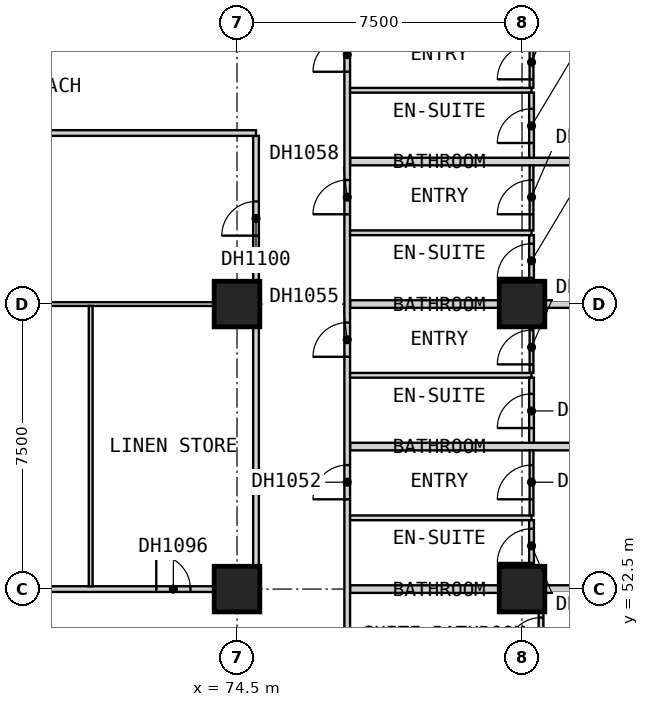
"""IFC4 building model, lengths in metres.
Left out: names, types, materials, properties, quantities, classifications, styles, units other than length and angle.
Written with IfcOpenShell. Run it as: python <this file> out.ifc"""

import sys

from ifc_helpers import new_model, si_unit, direction, frame, frame_2d, origin, origin_2d, place, context, subcontext, project, spatial, rectangle, extrude, element, fill, save


model = new_model("IFC4")
c1 = context("Model", 3, precision=1e-05, world=origin(), true_north=direction((0.0, 1.0)))
c2 = subcontext(c1, "Body", "Model", "MODEL_VIEW")
j1 = project(units=[si_unit("LENGTHUNIT", "METRE"), si_unit("PLANEANGLEUNIT", "RADIAN")], contexts=[c1])
p1 = place(None, origin())
s1 = spatial("IfcSite", under=j1, at=p1, CompositionType="ELEMENT")
p2 = place(p1, origin())
s2 = spatial("IfcBuilding", under=s1, at=p2, CompositionType="ELEMENT")
p3 = place(p2, frame((0.0, 0.0, 48.4)))
s3 = spatial("IfcBuildingStorey", under=s2, at=p3, CompositionType="ELEMENT", Elevation=48.4)
for number, where, z_axis, x_axis in (
    (1, (74.5, 52.5, 0.0), (0.0, 0.0, 1.0), (1.0, 0.0, 0.0)),
    (2, (74.5, 60.0, 0.0), (0.0, 0.0, 1.0), (1.0, 0.0, 0.0)),
    (3, (82.0, 52.5, 0.0), (0.0, 0.0, 1.0), (1.0, 0.0, 0.0)),
    (4, (82.0, 60.0, 0.0), (0.0, 0.0, 1.0), (1.0, 0.0, 0.0)),
):
    element("IfcColumn", number, at=place(p3, frame(where, z_axis=z_axis, x_axis=x_axis)), inside=s3, PredefinedType="COLUMN", context=c2, shape_type="SweptSolid", body=[
        extrude(rectangle(XDim=1.2, YDim=1.2, at=origin_2d()), origin(), (0.0, 0.0, 1.0), 3.6),
    ])
p4 = place(p3, frame((77.475, 52.5, 0.0), z_axis=(0.0, 0.0, 1.0), x_axis=(1.0, 0.0, 0.0)))
e5 = element("IfcWall", 5, at=p4, inside=s3, PredefinedType="PARTITIONING", context=c2, shape_type="SweptSolid", body=[
    extrude(rectangle(XDim=12.525, YDim=0.2, at=frame_2d((6.262, 0.0))), origin(), (0.0, 0.0, 1.0), 3.35),
])
p5 = place(p3, frame((77.475, 56.25, 0.0), z_axis=(0.0, 0.0, 1.0), x_axis=(1.0, 0.0, 0.0)))
e6 = element("IfcWall", 6, at=p5, inside=s3, PredefinedType="PARTITIONING", context=c2, shape_type="SweptSolid", body=[
    extrude(rectangle(XDim=11.715, YDim=0.2, at=frame_2d((5.857, 0.0))), origin(), (0.0, 0.0, 1.0), 3.35),
])
p6 = place(p3, frame((77.475, 60.0, 0.0), z_axis=(0.0, 0.0, 1.0), x_axis=(1.0, 0.0, 0.0)))
e7 = element("IfcWall", 7, at=p6, inside=s3, PredefinedType="PARTITIONING", context=c2, shape_type="SweptSolid", body=[
    extrude(rectangle(XDim=12.525, YDim=0.2, at=frame_2d((6.262, 0.0))), origin(), (0.0, 0.0, 1.0), 3.35),
])
p7 = place(p3, frame((77.475, 63.75, 0.0), z_axis=(0.0, 0.0, 1.0), x_axis=(1.0, 0.0, 0.0)))
e8 = element("IfcWall", 8, at=p7, inside=s3, PredefinedType="PARTITIONING", context=c2, shape_type="SweptSolid", body=[
    extrude(rectangle(XDim=11.715, YDim=0.2, at=frame_2d((5.857, 0.0))), origin(), (0.0, 0.0, 1.0), 3.35),
])
p8 = place(p3, frame((60.0, 52.5, 0.0), z_axis=(0.0, 0.0, 1.0), x_axis=(1.0, 0.0, 0.0)))
e9 = element("IfcWall", 9, at=p8, inside=s3, PredefinedType="PARTITIONING", context=c2, shape_type="SweptSolid", body=[
    extrude(rectangle(XDim=15.0, YDim=0.15, at=frame_2d((7.5, 0.0))), origin(), (0.0, 0.0, 1.0), 3.35),
])
p9 = place(p8, frame((4.875, 0.0, 0.0)))
e10 = element("IfcOpeningElement", 10, at=p9, cuts=e9, PredefinedType="OPENING", context=c2, shape_type="SweptSolid", body=[
    extrude(rectangle(XDim=0.9, YDim=2.1, at=frame_2d((0.45, 1.05))), frame((0.0, 0.085, 0.0), z_axis=(0.0, -1.0, 0.0), x_axis=(1.0, 0.0, 0.0)), (0.0, 0.0, 1.0), 0.17),
])
p10 = place(p8, frame((12.375, 0.0, 0.0)))
e11 = element("IfcOpeningElement", 11, at=p10, cuts=e9, PredefinedType="OPENING", context=c2, shape_type="SweptSolid", body=[
    extrude(rectangle(XDim=0.9, YDim=2.1, at=frame_2d((0.45, 1.05))), frame((0.0, 0.085, 0.0), z_axis=(0.0, -1.0, 0.0), x_axis=(1.0, 0.0, 0.0)), (0.0, 0.0, 1.0), 0.17),
])
p11 = place(p3, frame((75.0, 52.575, 0.0), z_axis=(0.0, 0.0, 1.0), x_axis=(0.0, 1.0, 0.0)))
e12 = element("IfcWall", 12, at=p11, inside=s3, PredefinedType="PARTITIONING", context=c2, shape_type="SweptSolid", body=[
    extrude(rectangle(XDim=11.85, YDim=0.15, at=frame_2d((5.925, 0.0))), origin(), (0.0, 0.0, 1.0), 3.35),
])
p12 = place(p11, frame((9.225, 0.0, 0.0)))
e13 = element("IfcOpeningElement", 13, at=p12, cuts=e12, PredefinedType="OPENING", context=c2, shape_type="SweptSolid", body=[
    extrude(rectangle(XDim=0.9, YDim=2.1, at=frame_2d((0.45, 1.05))), frame((0.0, 0.085, 0.0), z_axis=(0.0, -1.0, 0.0), x_axis=(1.0, 0.0, 0.0)), (0.0, 0.0, 1.0), 0.17),
])
p13 = place(p3, frame((77.4, 50.175, 0.0), z_axis=(0.0, 0.0, 1.0), x_axis=(0.0, 1.0, 0.0)))
e14 = element("IfcWall", 14, at=p13, inside=s3, PredefinedType="PARTITIONING", context=c2, shape_type="SweptSolid", body=[
    extrude(rectangle(XDim=42.15, YDim=0.15, at=frame_2d((21.075, 0.0))), origin(), (0.0, 0.0, 1.0), 3.35),
])
p14 = place(p13, frame((4.688, 0.0, 0.0)))
e15 = element("IfcOpeningElement", 15, at=p14, cuts=e14, PredefinedType="OPENING", context=c2, shape_type="SweptSolid", body=[
    extrude(rectangle(XDim=0.9, YDim=2.1, at=frame_2d((0.45, 1.05))), frame((0.0, 0.085, 0.0), z_axis=(0.0, -1.0, 0.0), x_axis=(1.0, 0.0, 0.0)), (0.0, 0.0, 1.0), 0.17),
])
p15 = place(p13, frame((8.438, 0.0, 0.0)))
e16 = element("IfcOpeningElement", 16, at=p15, cuts=e14, PredefinedType="OPENING", context=c2, shape_type="SweptSolid", body=[
    extrude(rectangle(XDim=0.9, YDim=2.1, at=frame_2d((0.45, 1.05))), frame((0.0, 0.085, 0.0), z_axis=(0.0, -1.0, 0.0), x_axis=(1.0, 0.0, 0.0)), (0.0, 0.0, 1.0), 0.17),
])
p16 = place(p13, frame((12.188, 0.0, 0.0)))
e17 = element("IfcOpeningElement", 17, at=p16, cuts=e14, PredefinedType="OPENING", context=c2, shape_type="SweptSolid", body=[
    extrude(rectangle(XDim=0.9, YDim=2.1, at=frame_2d((0.45, 1.05))), frame((0.0, 0.085, 0.0), z_axis=(0.0, -1.0, 0.0), x_axis=(1.0, 0.0, 0.0)), (0.0, 0.0, 1.0), 0.17),
])
p17 = place(p13, frame((15.938, 0.0, 0.0)))
e18 = element("IfcOpeningElement", 18, at=p17, cuts=e14, PredefinedType="OPENING", context=c2, shape_type="SweptSolid", body=[
    extrude(rectangle(XDim=0.9, YDim=2.1, at=frame_2d((0.45, 1.05))), frame((0.0, 0.085, 0.0), z_axis=(0.0, -1.0, 0.0), x_axis=(1.0, 0.0, 0.0)), (0.0, 0.0, 1.0), 0.17),
])
p18 = place(p13, frame((19.688, 0.0, 0.0)))
e19 = element("IfcOpeningElement", 19, at=p18, cuts=e14, PredefinedType="OPENING", context=c2, shape_type="SweptSolid", body=[
    extrude(rectangle(XDim=0.9, YDim=2.1, at=frame_2d((0.45, 1.05))), frame((0.0, 0.085, 0.0), z_axis=(0.0, -1.0, 0.0), x_axis=(1.0, 0.0, 0.0)), (0.0, 0.0, 1.0), 0.17),
])
p19 = place(p13, frame((23.438, 0.0, 0.0)))
e20 = element("IfcOpeningElement", 20, at=p19, cuts=e14, PredefinedType="OPENING", context=c2, shape_type="SweptSolid", body=[
    extrude(rectangle(XDim=0.9, YDim=2.1, at=frame_2d((0.45, 1.05))), frame((0.0, 0.085, 0.0), z_axis=(0.0, -1.0, 0.0), x_axis=(1.0, 0.0, 0.0)), (0.0, 0.0, 1.0), 0.17),
])
p20 = place(p13, frame((27.188, 0.0, 0.0)))
e21 = element("IfcOpeningElement", 21, at=p20, cuts=e14, PredefinedType="OPENING", context=c2, shape_type="SweptSolid", body=[
    extrude(rectangle(XDim=0.9, YDim=2.1, at=frame_2d((0.45, 1.05))), frame((0.0, 0.085, 0.0), z_axis=(0.0, -1.0, 0.0), x_axis=(1.0, 0.0, 0.0)), (0.0, 0.0, 1.0), 0.17),
])
p21 = place(p13, frame((30.938, 0.0, 0.0)))
e22 = element("IfcOpeningElement", 22, at=p21, cuts=e14, PredefinedType="OPENING", context=c2, shape_type="SweptSolid", body=[
    extrude(rectangle(XDim=0.9, YDim=2.1, at=frame_2d((0.45, 1.05))), frame((0.0, 0.085, 0.0), z_axis=(0.0, -1.0, 0.0), x_axis=(1.0, 0.0, 0.0)), (0.0, 0.0, 1.0), 0.17),
])
p22 = place(p13, frame((34.688, 0.0, 0.0)))
e23 = element("IfcOpeningElement", 23, at=p22, cuts=e14, PredefinedType="OPENING", context=c2, shape_type="SweptSolid", body=[
    extrude(rectangle(XDim=0.9, YDim=2.1, at=frame_2d((0.45, 1.05))), frame((0.0, 0.085, 0.0), z_axis=(0.0, -1.0, 0.0), x_axis=(1.0, 0.0, 0.0)), (0.0, 0.0, 1.0), 0.17),
])
p23 = place(p13, frame((38.438, 0.0, 0.0)))
e24 = element("IfcOpeningElement", 24, at=p23, cuts=e14, PredefinedType="OPENING", context=c2, shape_type="SweptSolid", body=[
    extrude(rectangle(XDim=0.9, YDim=2.1, at=frame_2d((0.45, 1.05))), frame((0.0, 0.085, 0.0), z_axis=(0.0, -1.0, 0.0), x_axis=(1.0, 0.0, 0.0)), (0.0, 0.0, 1.0), 0.17),
])
p24 = place(p3, frame((60.075, 60.0, 0.0), z_axis=(0.0, 0.0, 1.0), x_axis=(1.0, 0.0, 0.0)))
e25 = element("IfcWall", 25, at=p24, inside=s3, PredefinedType="PARTITIONING", context=c2, shape_type="SweptSolid", body=[
    extrude(rectangle(XDim=14.85, YDim=0.1, at=frame_2d((7.425, 0.0))), origin(), (0.0, 0.0, 1.0), 3.35),
])
p25 = place(p3, frame((70.65, 52.575, 0.0), z_axis=(0.0, 0.0, 1.0), x_axis=(0.0, 1.0, 0.0)))
e26 = element("IfcWall", 26, at=p25, inside=s3, PredefinedType="PARTITIONING", context=c2, shape_type="SweptSolid", body=[
    extrude(rectangle(XDim=7.375, YDim=0.1, at=frame_2d((3.688, 0.0))), origin(), (0.0, 0.0, 1.0), 3.35),
])
p26 = place(p3, frame((82.25, 54.438, 0.0), z_axis=(0.0, 0.0, 1.0), x_axis=(0.0, 1.0, 0.0)))
e27 = element("IfcWall", 27, at=p26, inside=s3, PredefinedType="PARTITIONING", context=c2, shape_type="SweptSolid", body=[
    extrude(rectangle(XDim=1.712, YDim=0.1, at=frame_2d((0.856, 0.0))), origin(), (0.0, 0.0, 1.0), 3.35),
])
p27 = place(p26, frame((0.425, 0.0, 0.0)))
e28 = element("IfcOpeningElement", 28, at=p27, cuts=e27, PredefinedType="OPENING", context=c2, shape_type="SweptSolid", body=[
    extrude(rectangle(XDim=0.9, YDim=2.1, at=frame_2d((0.45, 1.05))), frame((0.0, 0.06, 0.0), z_axis=(0.0, -1.0, 0.0), x_axis=(1.0, 0.0, 0.0)), (0.0, 0.0, 1.0), 0.12),
])
p28 = place(p3, frame((82.25, 58.188, 0.0), z_axis=(0.0, 0.0, 1.0), x_axis=(0.0, 1.0, 0.0)))
e29 = element("IfcWall", 29, at=p28, inside=s3, PredefinedType="PARTITIONING", context=c2, shape_type="SweptSolid", body=[
    extrude(rectangle(XDim=1.712, YDim=0.1, at=frame_2d((0.856, 0.0))), origin(), (0.0, 0.0, 1.0), 3.35),
])
p29 = place(p28, frame((0.225, 0.0, 0.0)))
e30 = element("IfcOpeningElement", 30, at=p29, cuts=e29, PredefinedType="OPENING", context=c2, shape_type="SweptSolid", body=[
    extrude(rectangle(XDim=0.9, YDim=2.1, at=frame_2d((0.45, 1.05))), frame((0.0, 0.06, 0.0), z_axis=(0.0, -1.0, 0.0), x_axis=(1.0, 0.0, 0.0)), (0.0, 0.0, 1.0), 0.12),
])
p30 = place(p3, frame((82.25, 61.938, 0.0), z_axis=(0.0, 0.0, 1.0), x_axis=(0.0, 1.0, 0.0)))
e31 = element("IfcWall", 31, at=p30, inside=s3, PredefinedType="PARTITIONING", context=c2, shape_type="SweptSolid", body=[
    extrude(rectangle(XDim=1.712, YDim=0.1, at=frame_2d((0.856, 0.0))), origin(), (0.0, 0.0, 1.0), 3.35),
])
p31 = place(p30, frame((0.425, 0.0, 0.0)))
e32 = element("IfcOpeningElement", 32, at=p31, cuts=e31, PredefinedType="OPENING", context=c2, shape_type="SweptSolid", body=[
    extrude(rectangle(XDim=0.9, YDim=2.1, at=frame_2d((0.45, 1.05))), frame((0.0, 0.06, 0.0), z_axis=(0.0, -1.0, 0.0), x_axis=(1.0, 0.0, 0.0)), (0.0, 0.0, 1.0), 0.12),
])
p32 = place(p3, frame((82.25, 65.688, 0.0), z_axis=(0.0, 0.0, 1.0), x_axis=(0.0, 1.0, 0.0)))
e33 = element("IfcWall", 33, at=p32, inside=s3, PredefinedType="PARTITIONING", context=c2, shape_type="SweptSolid", body=[
    extrude(rectangle(XDim=1.712, YDim=0.1, at=frame_2d((0.856, 0.0))), origin(), (0.0, 0.0, 1.0), 3.35),
])
p33 = place(p32, frame((0.225, 0.0, 0.0)))
e34 = element("IfcOpeningElement", 34, at=p33, cuts=e33, PredefinedType="OPENING", context=c2, shape_type="SweptSolid", body=[
    extrude(rectangle(XDim=0.9, YDim=2.1, at=frame_2d((0.45, 1.05))), frame((0.0, 0.06, 0.0), z_axis=(0.0, -1.0, 0.0), x_axis=(1.0, 0.0, 0.0)), (0.0, 0.0, 1.0), 0.12),
])
for number, where, z_axis, x_axis in (
    (35, (77.475, 54.375, 0.0), (0.0, 0.0, 1.0), (1.0, 0.0, 0.0)),
    (36, (77.475, 58.125, 0.0), (0.0, 0.0, 1.0), (1.0, 0.0, 0.0)),
    (37, (77.475, 61.875, 0.0), (0.0, 0.0, 1.0), (1.0, 0.0, 0.0)),
    (38, (77.475, 65.625, 0.0), (0.0, 0.0, 1.0), (1.0, 0.0, 0.0)),
):
    element("IfcWall", number, at=place(p3, frame(where, z_axis=z_axis, x_axis=x_axis)), inside=s3, PredefinedType="PARTITIONING", context=c2, shape_type="SweptSolid", body=[
        extrude(rectangle(XDim=4.775, YDim=0.125, at=frame_2d((2.387, 0.0))), origin(), (0.0, 0.0, 1.0), 3.35),
    ])
p34 = place(p3, frame((82.25, 52.6, 0.0), z_axis=(0.0, 0.0, 1.0), x_axis=(0.0, 1.0, 0.0)))
e39 = element("IfcWall", 39, at=p34, inside=s3, PredefinedType="PARTITIONING", context=c2, shape_type="SweptSolid", body=[
    extrude(rectangle(XDim=1.712, YDim=0.125, at=frame_2d((0.856, 0.0))), origin(), (0.0, 0.0, 1.0), 3.35),
])
p35 = place(p34, frame((0.587, 0.0, 0.0)))
e40 = element("IfcOpeningElement", 40, at=p35, cuts=e39, PredefinedType="OPENING", context=c2, shape_type="SweptSolid", body=[
    extrude(rectangle(XDim=0.9, YDim=2.1, at=frame_2d((0.45, 1.05))), frame((0.0, 0.073, 0.0), z_axis=(0.0, -1.0, 0.0), x_axis=(1.0, 0.0, 0.0)), (0.0, 0.0, 1.0), 0.145),
])
p36 = place(p3, frame((82.25, 56.35, 0.0), z_axis=(0.0, 0.0, 1.0), x_axis=(0.0, 1.0, 0.0)))
e41 = element("IfcWall", 41, at=p36, inside=s3, PredefinedType="PARTITIONING", context=c2, shape_type="SweptSolid", body=[
    extrude(rectangle(XDim=1.712, YDim=0.125, at=frame_2d((0.856, 0.0))), origin(), (0.0, 0.0, 1.0), 3.35),
])
p37 = place(p36, frame((0.387, 0.0, 0.0)))
e42 = element("IfcOpeningElement", 42, at=p37, cuts=e41, PredefinedType="OPENING", context=c2, shape_type="SweptSolid", body=[
    extrude(rectangle(XDim=0.9, YDim=2.1, at=frame_2d((0.45, 1.05))), frame((0.0, 0.073, 0.0), z_axis=(0.0, -1.0, 0.0), x_axis=(1.0, 0.0, 0.0)), (0.0, 0.0, 1.0), 0.145),
])
p38 = place(p3, frame((82.25, 60.1, 0.0), z_axis=(0.0, 0.0, 1.0), x_axis=(0.0, 1.0, 0.0)))
e43 = element("IfcWall", 43, at=p38, inside=s3, PredefinedType="PARTITIONING", context=c2, shape_type="SweptSolid", body=[
    extrude(rectangle(XDim=1.712, YDim=0.125, at=frame_2d((0.856, 0.0))), origin(), (0.0, 0.0, 1.0), 3.35),
])
p39 = place(p38, frame((0.587, 0.0, 0.0)))
e44 = element("IfcOpeningElement", 44, at=p39, cuts=e43, PredefinedType="OPENING", context=c2, shape_type="SweptSolid", body=[
    extrude(rectangle(XDim=0.9, YDim=2.1, at=frame_2d((0.45, 1.05))), frame((0.0, 0.073, 0.0), z_axis=(0.0, -1.0, 0.0), x_axis=(1.0, 0.0, 0.0)), (0.0, 0.0, 1.0), 0.145),
])
p40 = place(p3, frame((82.25, 63.85, 0.0), z_axis=(0.0, 0.0, 1.0), x_axis=(0.0, 1.0, 0.0)))
e45 = element("IfcWall", 45, at=p40, inside=s3, PredefinedType="PARTITIONING", context=c2, shape_type="SweptSolid", body=[
    extrude(rectangle(XDim=1.712, YDim=0.125, at=frame_2d((0.856, 0.0))), origin(), (0.0, 0.0, 1.0), 3.35),
])
p41 = place(p40, frame((0.387, 0.0, 0.0)))
e46 = element("IfcOpeningElement", 46, at=p41, cuts=e45, PredefinedType="OPENING", context=c2, shape_type="SweptSolid", body=[
    extrude(rectangle(XDim=0.9, YDim=2.1, at=frame_2d((0.45, 1.05))), frame((0.0, 0.073, 0.0), z_axis=(0.0, -1.0, 0.0), x_axis=(1.0, 0.0, 0.0)), (0.0, 0.0, 1.0), 0.145),
])
p42 = place(p3, frame((82.5, 50.163, 0.0), z_axis=(0.0, 0.0, 1.0), x_axis=(0.0, 1.0, 0.0)))
e47 = element("IfcWall", 47, at=p42, inside=s3, PredefinedType="PARTITIONING", context=c2, shape_type="SweptSolid", body=[
    extrude(rectangle(XDim=2.237, YDim=0.125, at=frame_2d((1.119, 0.0))), origin(), (0.0, 0.0, 1.0), 3.35),
])
p43 = place(p42, frame((0.688, 0.0, 0.0)))
e48 = element("IfcOpeningElement", 48, at=p43, cuts=e47, PredefinedType="OPENING", context=c2, shape_type="SweptSolid", body=[
    extrude(rectangle(XDim=0.9, YDim=2.1, at=frame_2d((0.45, 1.05))), frame((0.0, 0.073, 0.0), z_axis=(0.0, -1.0, 0.0), x_axis=(1.0, 0.0, 0.0)), (0.0, 0.0, 1.0), 0.145),
])
p44 = place(p3, frame((60.0, 64.5, 0.0), z_axis=(0.0, 0.0, 1.0), x_axis=(1.0, 0.0, 0.0)))
e49 = element("IfcWall", 49, at=p44, inside=s3, PredefinedType="PARTITIONING", context=c2, shape_type="SweptSolid", body=[
    extrude(rectangle(XDim=15.0, YDim=0.15, at=frame_2d((7.5, 0.0))), origin(), (0.0, 0.0, 1.0), 3.35),
])
p45 = place(p35, origin())
e50 = element("IfcDoor", 50, at=p45, inside=s3, OperationType="SINGLE_SWING_RIGHT", PredefinedType="DOOR", context=c2, shape_type="SweptSolid", body=[
    extrude(rectangle(XDim=0.9, YDim=2.1, at=frame_2d((0.45, 1.05))), frame((0.0, 0.025, 0.0), z_axis=(0.0, -1.0, 0.0), x_axis=(1.0, 0.0, 0.0)), (0.0, 0.0, 1.0), 0.05),
])
fill(e40, e50)
p46 = place(p14, origin())
e51 = element("IfcDoor", 51, at=p46, inside=s3, OperationType="SINGLE_SWING_RIGHT", PredefinedType="DOOR", context=c2, shape_type="SweptSolid", body=[
    extrude(rectangle(XDim=0.9, YDim=2.1, at=frame_2d((0.45, 1.05))), frame((0.0, 0.025, 0.0), z_axis=(0.0, -1.0, 0.0), x_axis=(1.0, 0.0, 0.0)), (0.0, 0.0, 1.0), 0.05),
])
fill(e15, e51)
p47 = place(p27, origin())
e52 = element("IfcDoor", 52, at=p47, inside=s3, OperationType="SINGLE_SWING_LEFT", PredefinedType="DOOR", context=c2, shape_type="SweptSolid", body=[
    extrude(rectangle(XDim=0.9, YDim=2.1, at=frame_2d((0.45, 1.05))), frame((0.0, 0.025, 0.0), z_axis=(0.0, -1.0, 0.0), x_axis=(1.0, 0.0, 0.0)), (0.0, 0.0, 1.0), 0.05),
])
fill(e28, e52)
p48 = place(p37, origin())
e53 = element("IfcDoor", 53, at=p48, inside=s3, OperationType="SINGLE_SWING_LEFT", PredefinedType="DOOR", context=c2, shape_type="SweptSolid", body=[
    extrude(rectangle(XDim=0.9, YDim=2.1, at=frame_2d((0.45, 1.05))), frame((0.0, 0.025, 0.0), z_axis=(0.0, -1.0, 0.0), x_axis=(1.0, 0.0, 0.0)), (0.0, 0.0, 1.0), 0.05),
])
fill(e42, e53)
p49 = place(p15, origin())
e54 = element("IfcDoor", 54, at=p49, inside=s3, OperationType="SINGLE_SWING_RIGHT", PredefinedType="DOOR", context=c2, shape_type="SweptSolid", body=[
    extrude(rectangle(XDim=0.9, YDim=2.1, at=frame_2d((0.45, 1.05))), frame((0.0, 0.025, 0.0), z_axis=(0.0, -1.0, 0.0), x_axis=(1.0, 0.0, 0.0)), (0.0, 0.0, 1.0), 0.05),
])
fill(e16, e54)
p50 = place(p29, origin())
e55 = element("IfcDoor", 55, at=p50, inside=s3, OperationType="SINGLE_SWING_LEFT", PredefinedType="DOOR", context=c2, shape_type="SweptSolid", body=[
    extrude(rectangle(XDim=0.9, YDim=2.1, at=frame_2d((0.45, 1.05))), frame((0.0, 0.025, 0.0), z_axis=(0.0, -1.0, 0.0), x_axis=(1.0, 0.0, 0.0)), (0.0, 0.0, 1.0), 0.05),
])
fill(e30, e55)
p51 = place(p39, origin())
e56 = element("IfcDoor", 56, at=p51, inside=s3, OperationType="SINGLE_SWING_RIGHT", PredefinedType="DOOR", context=c2, shape_type="SweptSolid", body=[
    extrude(rectangle(XDim=0.9, YDim=2.1, at=frame_2d((0.45, 1.05))), frame((0.0, 0.025, 0.0), z_axis=(0.0, -1.0, 0.0), x_axis=(1.0, 0.0, 0.0)), (0.0, 0.0, 1.0), 0.05),
])
fill(e44, e56)
p52 = place(p16, origin())
e57 = element("IfcDoor", 57, at=p52, inside=s3, OperationType="SINGLE_SWING_RIGHT", PredefinedType="DOOR", context=c2, shape_type="SweptSolid", body=[
    extrude(rectangle(XDim=0.9, YDim=2.1, at=frame_2d((0.45, 1.05))), frame((0.0, 0.025, 0.0), z_axis=(0.0, -1.0, 0.0), x_axis=(1.0, 0.0, 0.0)), (0.0, 0.0, 1.0), 0.05),
])
fill(e17, e57)
p53 = place(p31, origin())
e58 = element("IfcDoor", 58, at=p53, inside=s3, OperationType="SINGLE_SWING_LEFT", PredefinedType="DOOR", context=c2, shape_type="SweptSolid", body=[
    extrude(rectangle(XDim=0.9, YDim=2.1, at=frame_2d((0.45, 1.05))), frame((0.0, 0.025, 0.0), z_axis=(0.0, -1.0, 0.0), x_axis=(1.0, 0.0, 0.0)), (0.0, 0.0, 1.0), 0.05),
])
fill(e32, e58)
p54 = place(p41, origin())
e59 = element("IfcDoor", 59, at=p54, inside=s3, OperationType="SINGLE_SWING_LEFT", PredefinedType="DOOR", context=c2, shape_type="SweptSolid", body=[
    extrude(rectangle(XDim=0.9, YDim=2.1, at=frame_2d((0.45, 1.05))), frame((0.0, 0.025, 0.0), z_axis=(0.0, -1.0, 0.0), x_axis=(1.0, 0.0, 0.0)), (0.0, 0.0, 1.0), 0.05),
])
fill(e46, e59)
p55 = place(p17, origin())
e60 = element("IfcDoor", 60, at=p55, inside=s3, OperationType="SINGLE_SWING_RIGHT", PredefinedType="DOOR", context=c2, shape_type="SweptSolid", body=[
    extrude(rectangle(XDim=0.9, YDim=2.1, at=frame_2d((0.45, 1.05))), frame((0.0, 0.025, 0.0), z_axis=(0.0, -1.0, 0.0), x_axis=(1.0, 0.0, 0.0)), (0.0, 0.0, 1.0), 0.05),
])
fill(e18, e60)
p56 = place(p33, origin())
e61 = element("IfcDoor", 61, at=p56, inside=s3, OperationType="SINGLE_SWING_LEFT", PredefinedType="DOOR", context=c2, shape_type="SweptSolid", body=[
    extrude(rectangle(XDim=0.9, YDim=2.1, at=frame_2d((0.45, 1.05))), frame((0.0, 0.025, 0.0), z_axis=(0.0, -1.0, 0.0), x_axis=(1.0, 0.0, 0.0)), (0.0, 0.0, 1.0), 0.05),
])
fill(e34, e61)
p57 = place(p43, origin())
e62 = element("IfcDoor", 62, at=p57, inside=s3, OperationType="SINGLE_SWING_LEFT", PredefinedType="DOOR", context=c2, shape_type="SweptSolid", body=[
    extrude(rectangle(XDim=0.9, YDim=2.1, at=frame_2d((0.45, 1.05))), frame((0.0, 0.025, 0.0), z_axis=(0.0, -1.0, 0.0), x_axis=(1.0, 0.0, 0.0)), (0.0, 0.0, 1.0), 0.05),
])
fill(e48, e62)
p58 = place(p10, origin())
e63 = element("IfcDoor", 63, at=p58, inside=s3, OperationType="SINGLE_SWING_RIGHT", PredefinedType="DOOR", context=c2, shape_type="SweptSolid", body=[
    extrude(rectangle(XDim=0.9, YDim=2.1, at=frame_2d((0.45, 1.05))), frame((0.0, 0.025, 0.0), z_axis=(0.0, -1.0, 0.0), x_axis=(1.0, 0.0, 0.0)), (0.0, 0.0, 1.0), 0.05),
])
fill(e11, e63)
p59 = place(p12, origin())
e64 = element("IfcDoor", 64, at=p59, inside=s3, OperationType="SINGLE_SWING_LEFT", PredefinedType="DOOR", context=c2, shape_type="SweptSolid", body=[
    extrude(rectangle(XDim=0.9, YDim=2.1, at=frame_2d((0.45, 1.05))), frame((0.0, 0.025, 0.0), z_axis=(0.0, -1.0, 0.0), x_axis=(1.0, 0.0, 0.0)), (0.0, 0.0, 1.0), 0.05),
])
fill(e13, e64)
save(model, sys.argv[1])
